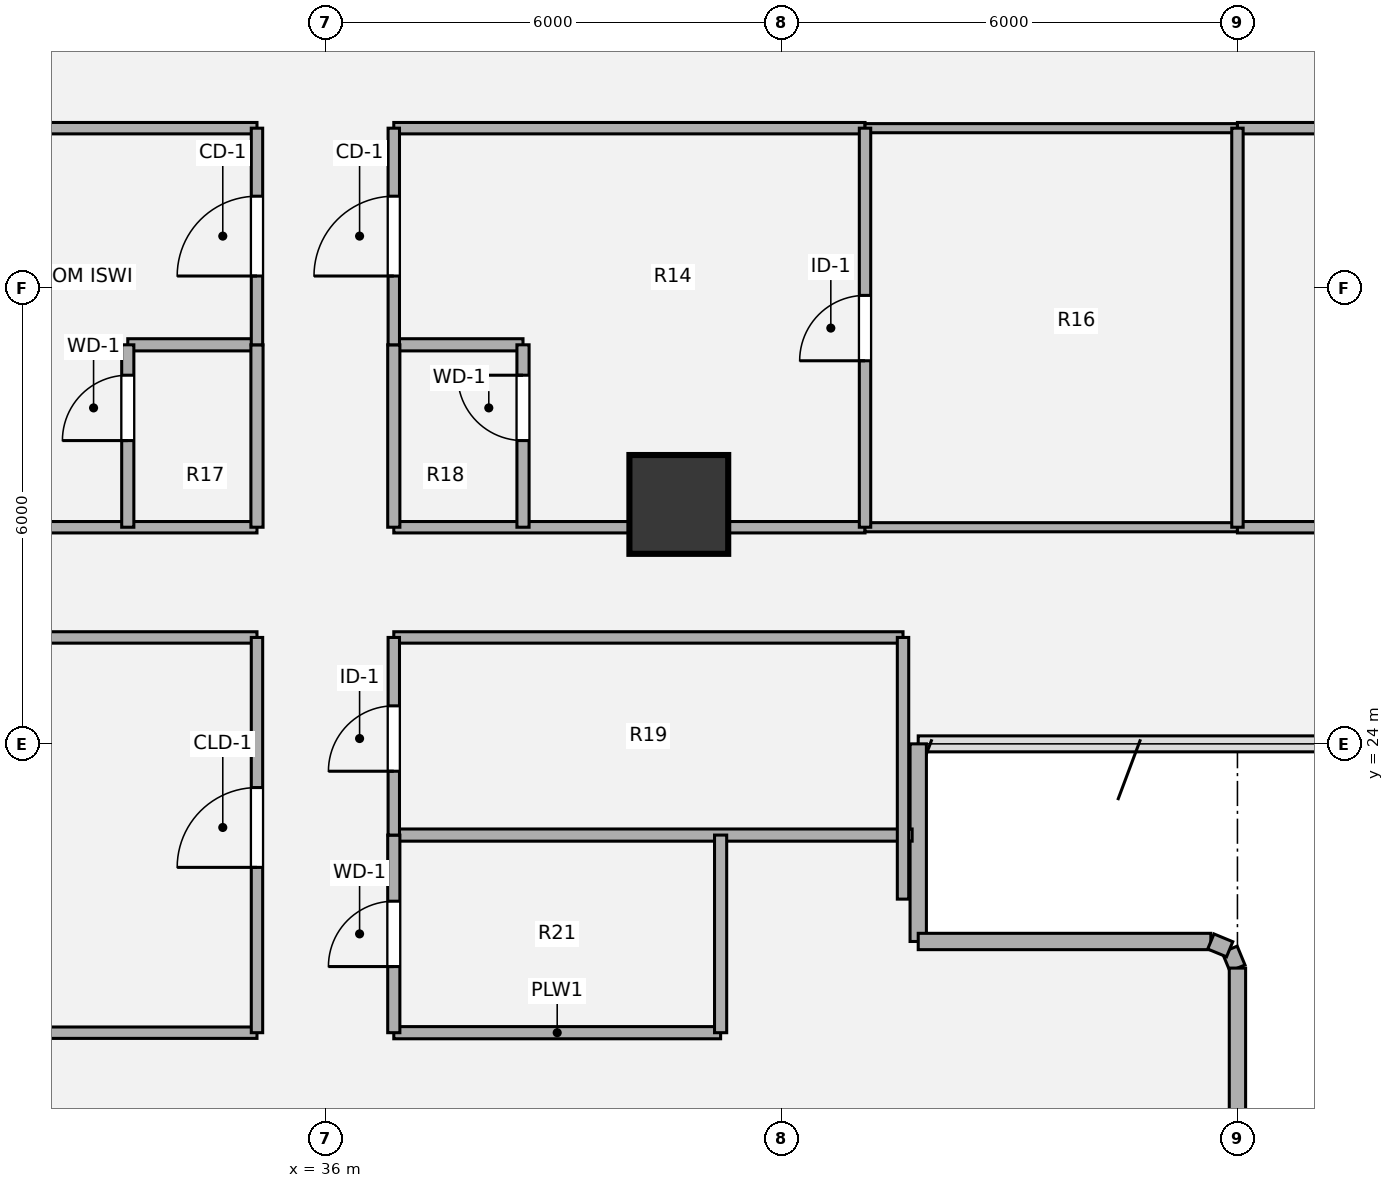
"""IFC4 building model, lengths in metres.
Left out: names, types, materials, properties, quantities, classifications, styles, units other than length and angle.
Written with IfcOpenShell. Run it as: python <this file> out.ifc"""

import sys

from ifc_helpers import new_model, si_unit, direction, frame, frame_2d, origin, origin_2d, place, context, subcontext, project, spatial, rectangle, hollow_circle, extrude, source, transform, mapped, element, fill, save


model = new_model("IFC4")
c1 = context("Model", 3, precision=1e-05, world=origin(), true_north=direction((0.0, 1.0)))
c2 = subcontext(c1, "Body", "Model", "MODEL_VIEW")
j1 = project(units=[si_unit("LENGTHUNIT", "METRE"), si_unit("PLANEANGLEUNIT", "RADIAN")], contexts=[c1])
p1 = place(None, origin())
s1 = spatial("IfcSite", under=j1, at=p1, CompositionType="ELEMENT")
p2 = place(p1, origin())
s2 = spatial("IfcBuilding", under=s1, at=p2, CompositionType="ELEMENT")
p3 = place(p2, frame((0.0, 0.0, 93.6)))
s3 = spatial("IfcBuildingStorey", under=s2, at=p3, CompositionType="ELEMENT", Elevation=93.6)
m1 = source(origin(), c2, "Body", "SweptSolid", [
    extrude(hollow_circle(Radius=0.65, WallThickness=0.045, at=origin_2d()), origin(), (0.0, 0.0, 1.0), 3.78),
])
p4 = place(p3, frame((40.65, 27.15, 0.0), z_axis=(0.0, 0.0, 1.0), x_axis=(1.0, 0.0, 0.0)))
e1 = element("IfcColumn", 1, at=p4, inside=s3, PredefinedType="COLUMN", context=c2, shape_type="MappedRepresentation", body=[
    mapped(m1, transform((0.0, 0.0, 0.0), x_axis=(1.0, 0.0, 0.0), y_axis=(0.0, 1.0, 0.0), z_axis=(0.0, 0.0, 1.0), scale=1.0)),
])
p5 = place(p3, frame((47.897, 21.298, 0.0), z_axis=(0.0, 0.0, 1.0), x_axis=(0.382673670509, -0.923883575944, 0.0)))
e2 = element("IfcWall", 2, at=p5, inside=s3, PredefinedType="SOLIDWALL", context=c2, shape_type="SweptSolid", body=[
    extrude(rectangle(XDim=0.268, YDim=0.215, at=frame_2d((0.134, 0.0))), origin(), (0.0, 0.0, 1.0), 3.53),
])
p6 = place(p3, frame((48.0, 21.05, 0.0), z_axis=(0.0, 0.0, 1.0), x_axis=(0.0, -1.0, 0.0)))
e3 = element("IfcWall", 3, at=p6, inside=s3, PredefinedType="SOLIDWALL", context=c2, shape_type="SweptSolid", body=[
    extrude(rectangle(XDim=2.62, YDim=0.215, at=frame_2d((1.31, 0.0))), origin(), (0.0, 0.0, 1.0), 3.53),
])
p7 = place(p3, frame((43.8, 24.0, 0.0), z_axis=(0.0, 0.0, 1.0), x_axis=(0.0, -1.0, 0.0)))
e4 = element("IfcWall", 4, at=p7, inside=s3, PredefinedType="SOLIDWALL", context=c2, shape_type="SweptSolid", body=[
    extrude(rectangle(XDim=2.6, YDim=0.215, at=frame_2d((1.3, 0.0))), origin(), (0.0, 0.0, 1.0), 3.53),
])
p8 = place(p3, frame((43.8, 21.4, 0.0), z_axis=(0.0, 0.0, 1.0), x_axis=(1.0, 0.0, 0.0)))
e5 = element("IfcWall", 5, at=p8, inside=s3, PredefinedType="SOLIDWALL", context=c2, shape_type="SweptSolid", body=[
    extrude(rectangle(XDim=3.85, YDim=0.215, at=frame_2d((1.925, 0.0))), origin(), (0.0, 0.0, 1.0), 3.53),
])
p9 = place(p3, frame((47.65, 21.4, 0.0), z_axis=(0.0, 0.0, 1.0), x_axis=(0.924205486139, -0.381895560841, 0.0)))
e6 = element("IfcWall", 6, at=p9, inside=s3, PredefinedType="SOLIDWALL", context=c2, shape_type="SweptSolid", body=[
    extrude(rectangle(XDim=0.268, YDim=0.215, at=frame_2d((0.134, 0.0))), origin(), (0.0, 0.0, 1.0), 3.53),
])
p10 = place(p3, frame((28.4, 20.2, 0.0), z_axis=(0.0, 0.0, 1.0), x_axis=(1.0, 0.0, 0.0)))
e7 = element("IfcWall", 7, at=p10, inside=s3, PredefinedType="PARTITIONING", context=c2, shape_type="SweptSolid", body=[
    extrude(rectangle(XDim=6.7, YDim=0.15, at=frame_2d((3.35, 0.0))), origin(), (0.0, 0.0, 1.0), 3.5),
])
p11 = place(p3, frame((36.9, 20.2, 0.0), z_axis=(0.0, 0.0, 1.0), x_axis=(1.0, 0.0, 0.0)))
e8 = element("IfcWall", 8, at=p11, inside=s3, PredefinedType="PLUMBINGWALL", context=c2, shape_type="SweptSolid", body=[
    extrude(rectangle(XDim=4.3, YDim=0.16, at=frame_2d((2.15, 0.0))), origin(), (0.0, 0.0, 1.0), 3.5),
])
p12 = place(p3, frame((36.9, 22.8, 0.0), z_axis=(0.0, 0.0, 1.0), x_axis=(1.0, 0.0, 0.0)))
e9 = element("IfcWall", 9, at=p12, inside=s3, PredefinedType="PLUMBINGWALL", context=c2, shape_type="SweptSolid", body=[
    extrude(rectangle(XDim=6.82, YDim=0.16, at=frame_2d((3.41, 0.0))), origin(), (0.0, 0.0, 1.0), 3.5),
])
for number, where, z_axis, x_axis in (
    (10, (28.4, 25.4, 0.0), (0.0, 0.0, 1.0), (1.0, 0.0, 0.0)),
    (11, (36.9, 25.4, 0.0), (0.0, 0.0, 1.0), (1.0, 0.0, 0.0)),
):
    element("IfcWall", number, at=place(p3, frame(where, z_axis=z_axis, x_axis=x_axis)), inside=s3, PredefinedType="PARTITIONING", context=c2, shape_type="SweptSolid", body=[
        extrude(rectangle(XDim=6.7, YDim=0.15, at=frame_2d((3.35, 0.0))), origin(), (0.0, 0.0, 1.0), 3.5),
    ])
for number, where, z_axis, x_axis in (
    (12, (28.9, 26.85, 0.0), (0.0, 0.0, 1.0), (1.0, 0.0, 0.0)),
    (13, (36.9, 26.85, 0.0), (0.0, 0.0, 1.0), (1.0, 0.0, 0.0)),
):
    element("IfcWall", number, at=place(p3, frame(where, z_axis=z_axis, x_axis=x_axis)), inside=s3, PredefinedType="PARTITIONING", context=c2, shape_type="SweptSolid", body=[
        extrude(rectangle(XDim=6.2, YDim=0.15, at=frame_2d((3.1, 0.0))), origin(), (0.0, 0.0, 1.0), 2.903),
    ])
p13 = place(p3, frame((43.1, 26.85, 0.0), z_axis=(0.0, 0.0, 1.0), x_axis=(1.0, 0.0, 0.0)))
e14 = element("IfcWall", 14, at=p13, inside=s3, PredefinedType="PARTITIONING", context=c2, shape_type="SweptSolid", body=[
    extrude(rectangle(XDim=4.9, YDim=0.12, at=frame_2d((2.45, 0.0))), origin(), (0.0, 0.0, 1.0), 3.055),
])
p14 = place(p3, frame((48.0, 26.85, 0.0), z_axis=(0.0, 0.0, 1.0), x_axis=(1.0, 0.0, 0.0)))
e15 = element("IfcWall", 15, at=p14, inside=s3, PredefinedType="PARTITIONING", context=c2, shape_type="SweptSolid", body=[
    extrude(rectangle(XDim=9.949, YDim=0.15, at=frame_2d((4.974, 0.0))), origin(), (0.0, 0.0, 1.0), 3.055),
])
for number, where, z_axis, x_axis in (
    (16, (33.4, 29.25, 0.0), (0.0, 0.0, 1.0), (1.0, 0.0, 0.0)),
    (17, (36.9, 29.25, 0.0), (0.0, 0.0, 1.0), (1.0, 0.0, 0.0)),
):
    element("IfcWall", number, at=place(p3, frame(where, z_axis=z_axis, x_axis=x_axis)), inside=s3, PredefinedType="PLUMBINGWALL", context=c2, shape_type="SweptSolid", body=[
        extrude(rectangle(XDim=1.7, YDim=0.16, at=frame_2d((0.85, 0.0))), origin(), (0.0, 0.0, 1.0), 3.259),
    ])
for number, where, z_axis, x_axis in (
    (18, (28.9, 32.1, 0.0), (0.0, 0.0, 1.0), (1.0, 0.0, 0.0)),
    (19, (36.9, 32.1, 0.0), (0.0, 0.0, 1.0), (1.0, 0.0, 0.0)),
):
    element("IfcWall", number, at=place(p3, frame(where, z_axis=z_axis, x_axis=x_axis)), inside=s3, PredefinedType="PARTITIONING", context=c2, shape_type="SweptSolid", body=[
        extrude(rectangle(XDim=6.2, YDim=0.15, at=frame_2d((3.1, 0.0))), origin(), (0.0, 0.0, 1.0), 2.982),
    ])
p15 = place(p3, frame((43.1, 32.1, 0.0), z_axis=(0.0, 0.0, 1.0), x_axis=(1.0, 0.0, 0.0)))
e20 = element("IfcWall", 20, at=p15, inside=s3, PredefinedType="PARTITIONING", context=c2, shape_type="SweptSolid", body=[
    extrude(rectangle(XDim=4.9, YDim=0.12, at=frame_2d((2.45, 0.0))), origin(), (0.0, 0.0, 1.0), 2.982),
])
p16 = place(p3, frame((48.0, 32.1, 0.0), z_axis=(0.0, 0.0, 1.0), x_axis=(1.0, 0.0, 0.0)))
e21 = element("IfcWall", 21, at=p16, inside=s3, PredefinedType="PARTITIONING", context=c2, shape_type="SweptSolid", body=[
    extrude(rectangle(XDim=10.02, YDim=0.15, at=frame_2d((5.01, 0.0))), origin(), (0.0, 0.0, 1.0), 2.982),
])
p17 = place(p16, frame((2.275, 0.0, 0.0)))
e22 = element("IfcOpeningElement", 22, at=p17, cuts=e21, PredefinedType="OPENING", context=c2, shape_type="SweptSolid", body=[
    extrude(rectangle(XDim=1.05, YDim=2.1, at=origin_2d()), frame((0.525, 0.085, 1.05), z_axis=(0.0, -1.0, 0.0), x_axis=(1.0, 0.0, 0.0)), (0.0, 0.0, 1.0), 0.17),
])
p18 = place(p3, frame((33.4, 26.85, 0.0), z_axis=(0.0, 0.0, 1.0), x_axis=(0.0, 1.0, 0.0)))
e23 = element("IfcWall", 23, at=p18, inside=s3, PredefinedType="PLUMBINGWALL", context=c2, shape_type="SweptSolid", body=[
    extrude(rectangle(XDim=2.4, YDim=0.16, at=frame_2d((1.2, 0.0))), origin(), (0.0, 0.0, 1.0), 3.5),
])
p19 = place(p18, frame((1.14, 0.0, 0.0)))
e24 = element("IfcOpeningElement", 24, at=p19, cuts=e23, PredefinedType="OPENING", context=c2, shape_type="SweptSolid", body=[
    extrude(rectangle(XDim=0.86, YDim=2.1, at=origin_2d()), frame((0.43, 0.09, 1.05), z_axis=(0.0, -1.0, 0.0), x_axis=(1.0, 0.0, 0.0)), (0.0, 0.0, 1.0), 0.18),
])
p20 = place(p3, frame((35.1, 20.2, 0.0), z_axis=(0.0, 0.0, 1.0), x_axis=(0.0, 1.0, 0.0)))
e25 = element("IfcWall", 25, at=p20, inside=s3, PredefinedType="PARTITIONING", context=c2, shape_type="SweptSolid", body=[
    extrude(rectangle(XDim=5.2, YDim=0.15, at=frame_2d((2.6, 0.0))), origin(), (0.0, 0.0, 1.0), 3.5),
])
p21 = place(p20, frame((2.175, 0.0, 0.0)))
e26 = element("IfcOpeningElement", 26, at=p21, cuts=e25, PredefinedType="OPENING", context=c2, shape_type="SweptSolid", body=[
    extrude(rectangle(XDim=1.05, YDim=2.1, at=origin_2d()), frame((0.525, 0.085, 1.05), z_axis=(0.0, -1.0, 0.0), x_axis=(1.0, 0.0, 0.0)), (0.0, 0.0, 1.0), 0.17),
])
p22 = place(p3, frame((35.1, 26.85, 0.0), z_axis=(0.0, 0.0, 1.0), x_axis=(0.0, 1.0, 0.0)))
e27 = element("IfcWall", 27, at=p22, inside=s3, PredefinedType="PLUMBINGWALL", context=c2, shape_type="SweptSolid", body=[
    extrude(rectangle(XDim=2.4, YDim=0.16, at=frame_2d((1.2, 0.0))), origin(), (0.0, 0.0, 1.0), 3.5),
])
p23 = place(p3, frame((35.1, 29.25, 0.0), z_axis=(0.0, 0.0, 1.0), x_axis=(0.0, 1.0, 0.0)))
e28 = element("IfcWall", 28, at=p23, inside=s3, PredefinedType="PARTITIONING", context=c2, shape_type="SweptSolid", body=[
    extrude(rectangle(XDim=2.85, YDim=0.15, at=frame_2d((1.425, 0.0))), origin(), (0.0, 0.0, 1.0), 3.5),
])
p24 = place(p23, frame((0.905, 0.0, 0.0)))
e29 = element("IfcOpeningElement", 29, at=p24, cuts=e28, PredefinedType="OPENING", context=c2, shape_type="SweptSolid", body=[
    extrude(rectangle(XDim=1.05, YDim=2.1, at=origin_2d()), frame((0.525, 0.085, 1.05), z_axis=(0.0, -1.0, 0.0), x_axis=(1.0, 0.0, 0.0)), (0.0, 0.0, 1.0), 0.17),
])
p25 = place(p3, frame((36.9, 20.2, 0.0), z_axis=(0.0, 0.0, 1.0), x_axis=(0.0, 1.0, 0.0)))
e30 = element("IfcWall", 30, at=p25, inside=s3, PredefinedType="PLUMBINGWALL", context=c2, shape_type="SweptSolid", body=[
    extrude(rectangle(XDim=2.6, YDim=0.16, at=frame_2d((1.3, 0.0))), origin(), (0.0, 0.0, 1.0), 3.5),
])
p26 = place(p25, frame((0.87, 0.0, 0.0)))
e31 = element("IfcOpeningElement", 31, at=p26, cuts=e30, PredefinedType="OPENING", context=c2, shape_type="SweptSolid", body=[
    extrude(rectangle(XDim=0.86, YDim=2.1, at=origin_2d()), frame((0.43, 0.09, 1.05), z_axis=(0.0, -1.0, 0.0), x_axis=(1.0, 0.0, 0.0)), (0.0, 0.0, 1.0), 0.18),
])
p27 = place(p3, frame((36.9, 22.8, 0.0), z_axis=(0.0, 0.0, 1.0), x_axis=(0.0, 1.0, 0.0)))
e32 = element("IfcWall", 32, at=p27, inside=s3, PredefinedType="PARTITIONING", context=c2, shape_type="SweptSolid", body=[
    extrude(rectangle(XDim=2.6, YDim=0.15, at=frame_2d((1.3, 0.0))), origin(), (0.0, 0.0, 1.0), 3.5),
])
p28 = place(p27, frame((0.84, 0.0, 0.0)))
e33 = element("IfcOpeningElement", 33, at=p28, cuts=e32, PredefinedType="OPENING", context=c2, shape_type="SweptSolid", body=[
    extrude(rectangle(XDim=0.86, YDim=2.1, at=origin_2d()), frame((0.43, 0.085, 1.05), z_axis=(0.0, -1.0, 0.0), x_axis=(1.0, 0.0, 0.0)), (0.0, 0.0, 1.0), 0.17),
])
p29 = place(p3, frame((36.9, 26.85, 0.0), z_axis=(0.0, 0.0, 1.0), x_axis=(0.0, 1.0, 0.0)))
e34 = element("IfcWall", 34, at=p29, inside=s3, PredefinedType="PLUMBINGWALL", context=c2, shape_type="SweptSolid", body=[
    extrude(rectangle(XDim=2.4, YDim=0.16, at=frame_2d((1.2, 0.0))), origin(), (0.0, 0.0, 1.0), 3.5),
])
p30 = place(p3, frame((36.9, 29.25, 0.0), z_axis=(0.0, 0.0, 1.0), x_axis=(0.0, 1.0, 0.0)))
e35 = element("IfcWall", 35, at=p30, inside=s3, PredefinedType="PARTITIONING", context=c2, shape_type="SweptSolid", body=[
    extrude(rectangle(XDim=2.85, YDim=0.15, at=frame_2d((1.425, 0.0))), origin(), (0.0, 0.0, 1.0), 3.5),
])
p31 = place(p30, frame((0.905, 0.0, 0.0)))
e36 = element("IfcOpeningElement", 36, at=p31, cuts=e35, PredefinedType="OPENING", context=c2, shape_type="SweptSolid", body=[
    extrude(rectangle(XDim=1.05, YDim=2.1, at=origin_2d()), frame((0.525, 0.085, 1.05), z_axis=(0.0, -1.0, 0.0), x_axis=(1.0, 0.0, 0.0)), (0.0, 0.0, 1.0), 0.17),
])
p32 = place(p3, frame((38.6, 26.85, 0.0), z_axis=(0.0, 0.0, 1.0), x_axis=(0.0, 1.0, 0.0)))
e37 = element("IfcWall", 37, at=p32, inside=s3, PredefinedType="PLUMBINGWALL", context=c2, shape_type="SweptSolid", body=[
    extrude(rectangle(XDim=2.4, YDim=0.16, at=frame_2d((1.2, 0.0))), origin(), (0.0, 0.0, 1.0), 3.5),
])
p33 = place(p32, frame((1.14, 0.0, 0.0)))
e38 = element("IfcOpeningElement", 38, at=p33, cuts=e37, PredefinedType="OPENING", context=c2, shape_type="SweptSolid", body=[
    extrude(rectangle(XDim=0.86, YDim=2.1, at=origin_2d()), frame((0.43, 0.09, 1.05), z_axis=(0.0, -1.0, 0.0), x_axis=(1.0, 0.0, 0.0)), (0.0, 0.0, 1.0), 0.18),
])
p34 = place(p3, frame((41.2, 20.2, 0.0), z_axis=(0.0, 0.0, 1.0), x_axis=(0.0, 1.0, 0.0)))
e39 = element("IfcWall", 39, at=p34, inside=s3, PredefinedType="PLUMBINGWALL", context=c2, shape_type="SweptSolid", body=[
    extrude(rectangle(XDim=2.6, YDim=0.16, at=frame_2d((1.3, 0.0))), origin(), (0.0, 0.0, 1.0), 2.815),
])
p35 = place(p3, frame((43.1, 26.85, 0.0), z_axis=(0.0, 0.0, 1.0), x_axis=(0.0, 1.0, 0.0)))
e40 = element("IfcWall", 40, at=p35, inside=s3, PredefinedType="PARTITIONING", context=c2, shape_type="SweptSolid", body=[
    extrude(rectangle(XDim=5.25, YDim=0.15, at=frame_2d((2.625, 0.0))), origin(), (0.0, 0.0, 1.0), 3.5),
])
p36 = place(p35, frame((2.19, 0.0, 0.0)))
e41 = element("IfcOpeningElement", 41, at=p36, cuts=e40, PredefinedType="OPENING", context=c2, shape_type="SweptSolid", body=[
    extrude(rectangle(XDim=0.86, YDim=2.1, at=origin_2d()), frame((0.43, 0.085, 1.05), z_axis=(0.0, -1.0, 0.0), x_axis=(1.0, 0.0, 0.0)), (0.0, 0.0, 1.0), 0.17),
])
p37 = place(p3, frame((43.6, 21.958, 0.0), z_axis=(0.0, 0.0, 1.0), x_axis=(0.0, 1.0, 0.0)))
e42 = element("IfcWall", 42, at=p37, inside=s3, PredefinedType="PARTITIONING", context=c2, shape_type="SweptSolid", body=[
    extrude(rectangle(XDim=3.442, YDim=0.15, at=frame_2d((1.721, 0.0))), origin(), (0.0, 0.0, 1.0), 3.5),
])
p38 = place(p3, frame((48.0, 26.85, 0.0), z_axis=(0.0, 0.0, 1.0), x_axis=(0.0, 1.0, 0.0)))
e43 = element("IfcWall", 43, at=p38, inside=s3, PredefinedType="PARTITIONING", context=c2, shape_type="SweptSolid", body=[
    extrude(rectangle(XDim=5.25, YDim=0.15, at=frame_2d((2.625, 0.0))), origin(), (0.0, 0.0, 1.0), 3.5),
])
m2 = source(origin(), c2, "Body", "SweptSolid", [
    extrude(rectangle(XDim=0.86, YDim=2.1, at=origin_2d()), frame((0.43, 0.025, 1.05), z_axis=(0.0, -1.0, 0.0), x_axis=(1.0, 0.0, 0.0)), (0.0, 0.0, 1.0), 0.05),
])
p39 = place(p19, origin())
e44 = element("IfcDoor", 44, at=p39, inside=s3, OperationType="SINGLE_SWING_LEFT", PredefinedType="DOOR", context=c2, shape_type="MappedRepresentation", body=[
    mapped(m2, transform((0.0, 0.0, 0.0), x_axis=(1.0, 0.0, 0.0), y_axis=(0.0, 1.0, 0.0), z_axis=(0.0, 0.0, 1.0), scale=1.0)),
])
fill(e24, e44)
m3 = source(origin(), c2, "Body", "SweptSolid", [
    extrude(rectangle(XDim=1.05, YDim=2.1, at=origin_2d()), frame((0.525, 0.025, 1.05), z_axis=(0.0, -1.0, 0.0), x_axis=(1.0, 0.0, 0.0)), (0.0, 0.0, 1.0), 0.05),
])
p40 = place(p21, origin())
e45 = element("IfcDoor", 45, at=p40, inside=s3, OperationType="SINGLE_SWING_LEFT", PredefinedType="DOOR", context=c2, shape_type="MappedRepresentation", body=[
    mapped(m3, transform((0.0, 0.0, 0.0), x_axis=(1.0, 0.0, 0.0), y_axis=(0.0, 1.0, 0.0), z_axis=(0.0, 0.0, 1.0), scale=1.0)),
])
fill(e26, e45)
m4 = source(origin(), c2, "Body", "SweptSolid", [
    extrude(rectangle(XDim=1.05, YDim=2.1, at=origin_2d()), frame((0.525, 0.025, 1.05), z_axis=(0.0, -1.0, 0.0), x_axis=(1.0, 0.0, 0.0)), (0.0, 0.0, 1.0), 0.05),
])
p41 = place(p24, origin())
e46 = element("IfcDoor", 46, at=p41, inside=s3, OperationType="SINGLE_SWING_LEFT", PredefinedType="DOOR", context=c2, shape_type="MappedRepresentation", body=[
    mapped(m4, transform((0.0, 0.0, 0.0), x_axis=(1.0, 0.0, 0.0), y_axis=(0.0, 1.0, 0.0), z_axis=(0.0, 0.0, 1.0), scale=1.0)),
])
fill(e29, e46)
p42 = place(p26, origin())
e47 = element("IfcDoor", 47, at=p42, inside=s3, OperationType="SINGLE_SWING_LEFT", PredefinedType="DOOR", context=c2, shape_type="MappedRepresentation", body=[
    mapped(m2, transform((0.0, 0.0, 0.0), x_axis=(1.0, 0.0, 0.0), y_axis=(0.0, 1.0, 0.0), z_axis=(0.0, 0.0, 1.0), scale=1.0)),
])
fill(e31, e47)
m5 = source(origin(), c2, "Body", "SweptSolid", [
    extrude(rectangle(XDim=0.86, YDim=2.1, at=origin_2d()), frame((0.43, 0.025, 1.05), z_axis=(0.0, -1.0, 0.0), x_axis=(1.0, 0.0, 0.0)), (0.0, 0.0, 1.0), 0.05),
])
p43 = place(p28, origin())
e48 = element("IfcDoor", 48, at=p43, inside=s3, OperationType="SINGLE_SWING_LEFT", PredefinedType="DOOR", context=c2, shape_type="MappedRepresentation", body=[
    mapped(m5, transform((0.0, 0.0, 0.0), x_axis=(1.0, 0.0, 0.0), y_axis=(0.0, 1.0, 0.0), z_axis=(0.0, 0.0, 1.0), scale=1.0)),
])
fill(e33, e48)
p44 = place(p31, origin())
e49 = element("IfcDoor", 49, at=p44, inside=s3, OperationType="SINGLE_SWING_LEFT", PredefinedType="DOOR", context=c2, shape_type="MappedRepresentation", body=[
    mapped(m4, transform((0.0, 0.0, 0.0), x_axis=(1.0, 0.0, 0.0), y_axis=(0.0, 1.0, 0.0), z_axis=(0.0, 0.0, 1.0), scale=1.0)),
])
fill(e36, e49)
p45 = place(p33, origin())
e50 = element("IfcDoor", 50, at=p45, inside=s3, OperationType="SINGLE_SWING_RIGHT", PredefinedType="DOOR", context=c2, shape_type="MappedRepresentation", body=[
    mapped(m2, transform((0.0, 0.0, 0.0), x_axis=(1.0, 0.0, 0.0), y_axis=(0.0, 1.0, 0.0), z_axis=(0.0, 0.0, 1.0), scale=1.0)),
])
fill(e38, e50)
p46 = place(p36, origin())
e51 = element("IfcDoor", 51, at=p46, inside=s3, OperationType="SINGLE_SWING_LEFT", PredefinedType="DOOR", context=c2, shape_type="MappedRepresentation", body=[
    mapped(m5, transform((0.0, 0.0, 0.0), x_axis=(1.0, 0.0, 0.0), y_axis=(0.0, 1.0, 0.0), z_axis=(0.0, 0.0, 1.0), scale=1.0)),
])
fill(e41, e51)
save(model, sys.argv[1])
